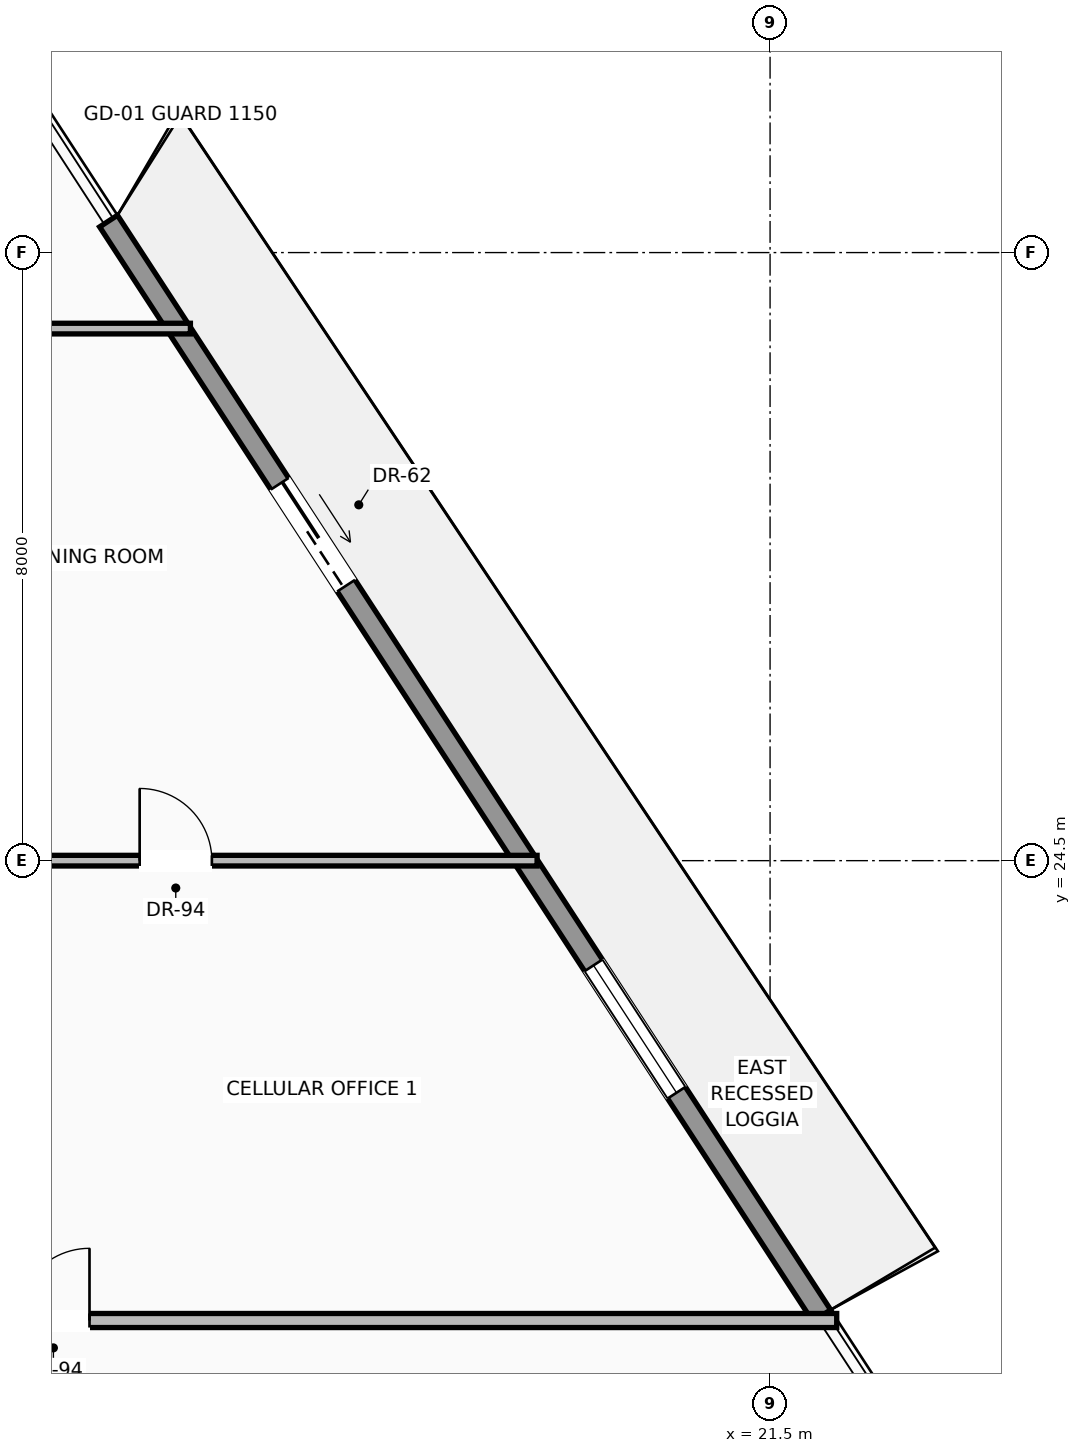
"""IFC4 building model, lengths in metres.
Left out: names, types, materials, properties, quantities, classifications, styles, units other than length and angle.
Written with IfcOpenShell. Run it as: python <this file> out.ifc"""

import sys

from ifc_helpers import new_model, si_unit, direction, frame, frame_2d, origin, place, context, subcontext, project, spatial, rectangle, extrude, source, transform, mapped, element, fill, save


model = new_model("IFC4")
c1 = context("Model", 3, precision=1e-05, world=origin(), true_north=direction((0.0, 1.0)))
c2 = subcontext(c1, "Body", "Model", "MODEL_VIEW")
j1 = project(units=[si_unit("LENGTHUNIT", "METRE"), si_unit("PLANEANGLEUNIT", "RADIAN")], contexts=[c1])
p1 = place(None, origin())
s1 = spatial("IfcSite", under=j1, at=p1, CompositionType="ELEMENT")
p2 = place(p1, origin())
s2 = spatial("IfcBuilding", under=s1, at=p2, CompositionType="ELEMENT")
p3 = place(p2, frame((0.0, 0.0, 84.0)))
s3 = spatial("IfcBuildingStorey", under=s2, at=p3, CompositionType="ELEMENT", Elevation=84.0)
p4 = place(p3, frame((12.796, 32.914, 0.0), z_axis=(0.0, 0.0, 1.0), x_axis=(0.545943631237, -0.837821909186, 0.0)))
e1 = element("IfcWall", 1, at=p4, inside=s3, PredefinedType="SOLIDWALL", context=c2, shape_type="SweptSolid", body=[
    extrude(rectangle(XDim=17.187, YDim=0.28, at=frame_2d((8.594, 0.0))), origin(), (0.0, 0.0, 1.0), 3.03),
])
p5 = place(p4, frame((4.125, 0.0, 0.0)))
e2 = element("IfcOpeningElement", 2, at=p5, cuts=e1, PredefinedType="OPENING", context=c2, shape_type="SweptSolid", body=[
    extrude(rectangle(XDim=1.6, YDim=2.35, at=frame_2d((0.8, 1.175))), frame((0.0, 0.15, 0.0), z_axis=(0.0, -1.0, 0.0), x_axis=(1.0, 0.0, 0.0)), (0.0, 0.0, 1.0), 0.3),
])
p6 = place(p4, frame((11.688, 0.0, 0.9)))
e3 = element("IfcOpeningElement", 3, at=p6, cuts=e1, PredefinedType="OPENING", context=c2, shape_type="SweptSolid", body=[
    extrude(rectangle(XDim=2.0, YDim=1.85, at=frame_2d((1.0, 0.925))), frame((0.0, 0.15, 0.0), z_axis=(0.0, -1.0, 0.0), x_axis=(1.0, 0.0, 0.0)), (0.0, 0.0, 1.0), 0.3),
])
p7 = place(p3, frame((-0.45, 18.45, 0.0), z_axis=(0.0, 0.0, 1.0), x_axis=(1.0, 0.0, 0.0)))
e4 = element("IfcWall", 4, at=p7, inside=s3, PredefinedType="PARTITIONING", context=c2, shape_type="SweptSolid", body=[
    extrude(rectangle(XDim=22.827, YDim=0.185, at=frame_2d((11.413, 0.0))), origin(), (0.0, 0.0, 1.0), 2.747),
])
p8 = place(p7, frame((12.046, 0.0, 0.0)))
e5 = element("IfcOpeningElement", 5, at=p8, cuts=e4, PredefinedType="OPENING", context=c2, shape_type="SweptSolid", body=[
    extrude(rectangle(XDim=0.95, YDim=2.2, at=frame_2d((0.475, 1.1))), frame((0.0, 0.103, 0.0), z_axis=(0.0, -1.0, 0.0), x_axis=(1.0, 0.0, 0.0)), (0.0, 0.0, 1.0), 0.205),
])
p9 = place(p3, frame((5.5, 24.5, 0.0), z_axis=(0.0, 0.0, 1.0), x_axis=(1.0, 0.0, 0.0)))
e6 = element("IfcWall", 6, at=p9, inside=s3, PredefinedType="PARTITIONING", context=c2, shape_type="SweptSolid", body=[
    extrude(rectangle(XDim=12.935, YDim=0.14, at=frame_2d((6.467, 0.0))), origin(), (0.0, 0.0, 1.0), 2.747),
])
p10 = place(p9, frame((7.706, 0.0, 0.0)))
e7 = element("IfcOpeningElement", 7, at=p10, cuts=e6, PredefinedType="OPENING", context=c2, shape_type="SweptSolid", body=[
    extrude(rectangle(XDim=0.95, YDim=2.2, at=frame_2d((0.475, 1.1))), frame((0.0, 0.08, 0.0), z_axis=(0.0, -1.0, 0.0), x_axis=(1.0, 0.0, 0.0)), (0.0, 0.0, 1.0), 0.16),
])
p11 = place(p3, frame((-0.45, 31.5, 0.0), z_axis=(0.0, 0.0, 1.0), x_axis=(1.0, 0.0, 0.0)))
e8 = element("IfcWall", 8, at=p11, inside=s3, PredefinedType="PARTITIONING", context=c2, shape_type="SweptSolid", body=[
    extrude(rectangle(XDim=14.323, YDim=0.14, at=frame_2d((7.162, 0.0))), origin(), (0.0, 0.0, 1.0), 2.747),
])
m1 = source(origin(), c2, "Body", "SweptSolid", [
    extrude(rectangle(XDim=1.6, YDim=2.35, at=frame_2d((0.8, 1.175))), frame((0.0, 0.025, 0.0), z_axis=(0.0, -1.0, 0.0), x_axis=(1.0, 0.0, 0.0)), (0.0, 0.0, 1.0), 0.05),
])
p12 = place(p5, origin())
e9 = element("IfcDoor", 9, at=p12, inside=s3, OperationType="SLIDING_TO_RIGHT", PredefinedType="DOOR", context=c2, shape_type="MappedRepresentation", body=[
    mapped(m1, transform((0.0, 0.0, 0.0), scale=1.0)),
])
fill(e2, e9)
m2 = source(origin(), c2, "Body", "SweptSolid", [
    extrude(rectangle(XDim=2.0, YDim=1.85, at=frame_2d((1.0, 0.925))), frame((0.0, 0.03, 0.0), z_axis=(0.0, -1.0, 0.0), x_axis=(1.0, 0.0, 0.0)), (0.0, 0.0, 1.0), 0.06),
])
p13 = place(p6, origin())
e10 = element("IfcWindow", 10, at=p13, inside=s3, PartitioningType="SINGLE_PANEL", PredefinedType="WINDOW", context=c2, shape_type="MappedRepresentation", body=[
    mapped(m2, transform((0.0, 0.0, 0.0), scale=1.0)),
])
fill(e3, e10)
m3 = source(origin(), c2, "Body", "SweptSolid", [
    extrude(rectangle(XDim=0.95, YDim=2.2, at=frame_2d((0.475, 1.1))), frame((0.0, 0.025, 0.0), z_axis=(0.0, -1.0, 0.0), x_axis=(1.0, 0.0, 0.0)), (0.0, 0.0, 1.0), 0.05),
])
p14 = place(p8, origin())
e11 = element("IfcDoor", 11, at=p14, inside=s3, OperationType="SINGLE_SWING_RIGHT", PredefinedType="DOOR", context=c2, shape_type="MappedRepresentation", body=[
    mapped(m3, transform((0.0, 0.0, 0.0), scale=1.0)),
])
fill(e5, e11)
p15 = place(p10, origin())
e12 = element("IfcDoor", 12, at=p15, inside=s3, OperationType="SINGLE_SWING_LEFT", PredefinedType="DOOR", context=c2, shape_type="MappedRepresentation", body=[
    mapped(m3, transform((0.0, 0.0, 0.0), scale=1.0)),
])
fill(e7, e12)
save(model, sys.argv[1])
